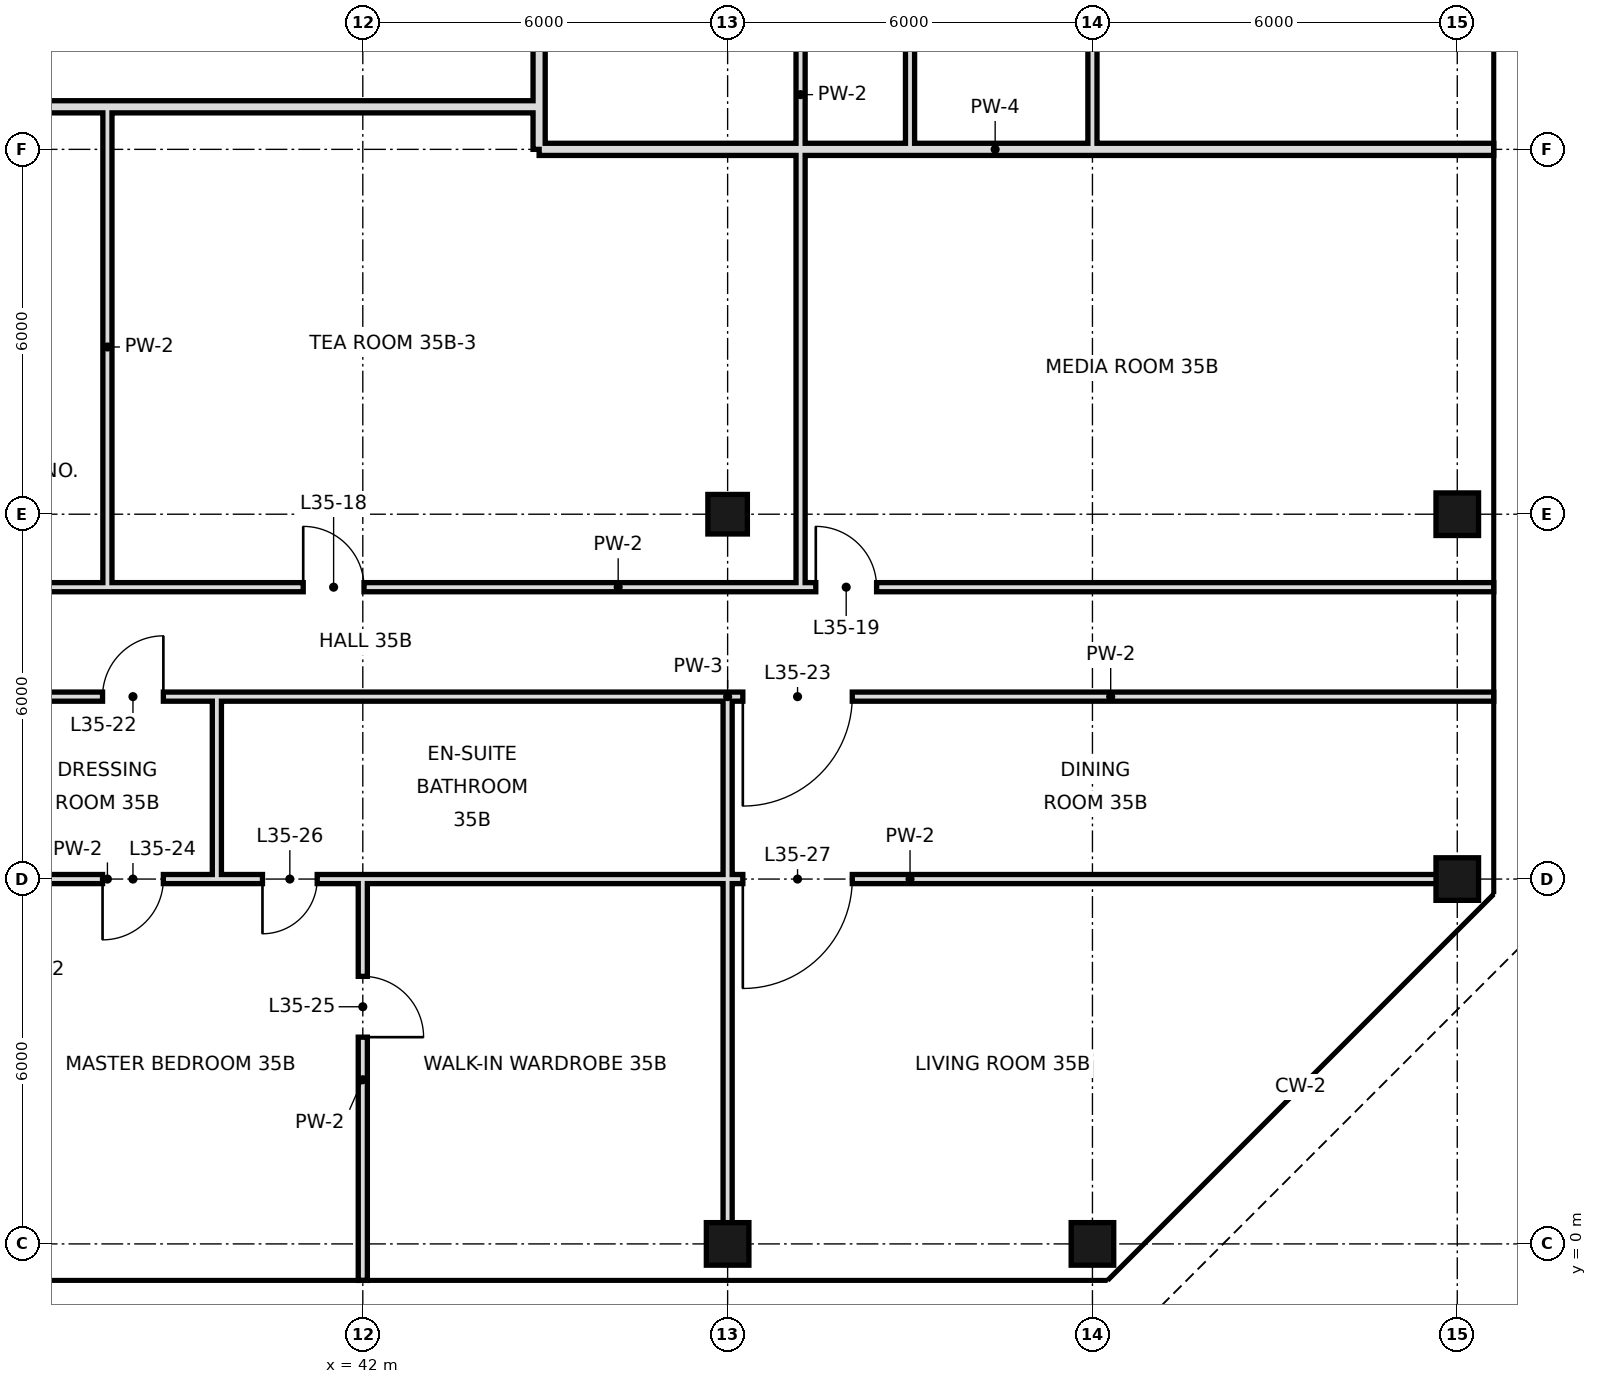
"""IFC4 building model, lengths in metres.
Left out: names, types, materials, properties, quantities, classifications, styles, units other than length and angle.
Written with IfcOpenShell. Run it as: python <this file> out.ifc"""

import sys

from ifc_helpers import new_model, si_unit, direction, frame, frame_2d, origin, origin_2d, place, context, subcontext, project, spatial, rectangle, hollow_rectangle, extrude, element, fill, save


model = new_model("IFC4")
c1 = context("Model", 3, precision=1e-05, world=origin(), true_north=direction((0.0, 1.0)))
c2 = subcontext(c1, "Body", "Model", "MODEL_VIEW")
j1 = project(units=[si_unit("LENGTHUNIT", "METRE"), si_unit("PLANEANGLEUNIT", "RADIAN")], contexts=[c1])
p1 = place(None, origin())
s1 = spatial("IfcSite", under=j1, at=p1, CompositionType="ELEMENT")
p2 = place(p1, origin())
s2 = spatial("IfcBuilding", under=s1, at=p2, CompositionType="ELEMENT")
p3 = place(p2, frame((0.0, 0.0, 154.6)))
s3 = spatial("IfcBuildingStorey", under=s2, at=p3, CompositionType="ELEMENT", Elevation=154.6)
p4 = place(p3, frame((48.0, 0.0, 0.0), z_axis=(0.0, 0.0, 1.0), x_axis=(1.0, 0.0, 0.0)))
e1 = element("IfcColumn", 1, at=p4, inside=s3, PredefinedType="COLUMN", context=c2, shape_type="SweptSolid", body=[
    extrude(hollow_rectangle(XDim=0.7, YDim=0.7, WallThickness=0.036, at=origin_2d()), origin(), (0.0, 0.0, 1.0), 3.6),
])
p5 = place(p3, frame((48.0, 12.0, 0.0), z_axis=(0.0, 0.0, 1.0), x_axis=(1.0, 0.0, 0.0)))
e2 = element("IfcColumn", 2, at=p5, inside=s3, PredefinedType="COLUMN", context=c2, shape_type="SweptSolid", body=[
    extrude(hollow_rectangle(XDim=0.65, YDim=0.65, WallThickness=0.032, at=origin_2d()), origin(), (0.0, 0.0, 1.0), 3.6),
])
for number, where, z_axis, x_axis in (
    (3, (54.0, 0.0, 0.0), (0.0, 0.0, 1.0), (1.0, 0.0, 0.0)),
    (4, (60.0, 6.0, 0.0), (0.0, 0.0, 1.0), (1.0, 0.0, 0.0)),
    (5, (60.0, 12.0, 0.0), (0.0, 0.0, 1.0), (1.0, 0.0, 0.0)),
):
    element("IfcColumn", number, at=place(p3, frame(where, z_axis=z_axis, x_axis=x_axis)), inside=s3, PredefinedType="COLUMN", context=c2, shape_type="SweptSolid", body=[
        extrude(hollow_rectangle(XDim=0.7, YDim=0.7, WallThickness=0.036, at=origin_2d()), origin(), (0.0, 0.0, 1.0), 3.6),
    ])
p6 = place(p3, frame((37.8, 10.8, 0.0), z_axis=(0.0, 0.0, 1.0), x_axis=(0.0, 1.0, 0.0)))
e6 = element("IfcWall", 6, at=p6, inside=s3, PredefinedType="PARTITIONING", context=c2, shape_type="SweptSolid", body=[
    extrude(rectangle(XDim=7.9, YDim=0.15, at=frame_2d((3.95, 0.0))), origin(), (0.0, 0.0, 1.0), 3.42),
])
p7 = place(p3, frame((39.6, 6.0, 0.0), z_axis=(0.0, 0.0, 1.0), x_axis=(0.0, 1.0, 0.0)))
e7 = element("IfcWall", 7, at=p7, inside=s3, PredefinedType="PARTITIONING", context=c2, shape_type="SweptSolid", body=[
    extrude(rectangle(XDim=3.0, YDim=0.15, at=frame_2d((1.5, 0.0))), origin(), (0.0, 0.0, 1.0), 3.42),
])
p8 = place(p3, frame((42.0, -0.6, 0.0), z_axis=(0.0, 0.0, 1.0), x_axis=(0.0, 1.0, 0.0)))
e8 = element("IfcWall", 8, at=p8, inside=s3, PredefinedType="PARTITIONING", context=c2, shape_type="SweptSolid", body=[
    extrude(rectangle(XDim=6.6, YDim=0.15, at=frame_2d((3.3, 0.0))), origin(), (0.0, 0.0, 1.0), 2.72),
])
p9 = place(p8, frame((4.0, 0.0, 0.0)))
e9 = element("IfcOpeningElement", 9, at=p9, cuts=e8, PredefinedType="OPENING", context=c2, shape_type="SweptSolid", body=[
    extrude(rectangle(XDim=1.0, YDim=2.4, at=frame_2d((0.5, 1.2))), frame((0.0, 0.085, 0.0), z_axis=(0.0, -1.0, 0.0), x_axis=(1.0, 0.0, 0.0)), (0.0, 0.0, 1.0), 0.17),
])
p10 = place(p3, frame((44.9, 18.7, 0.0), z_axis=(0.0, 0.0, 1.0), x_axis=(0.0, 1.0, 0.0)))
e10 = element("IfcWall", 10, at=p10, inside=s3, PredefinedType="SOLIDWALL", context=c2, shape_type="SweptSolid", body=[
    extrude(rectangle(XDim=25.7, YDim=0.2, at=frame_2d((12.85, 0.0))), origin(), (0.0, 0.0, 1.0), 2.97),
])
p11 = place(p10, frame((12.5, 0.0, 0.0)))
e11 = element("IfcOpeningElement", 11, at=p11, cuts=e10, PredefinedType="OPENING", context=c2, shape_type="SweptSolid", body=[
    extrude(rectangle(XDim=1.2, YDim=2.4, at=frame_2d((0.6, 1.2))), frame((0.0, 0.11, 0.0), z_axis=(0.0, -1.0, 0.0), x_axis=(1.0, 0.0, 0.0)), (0.0, 0.0, 1.0), 0.22),
])
p12 = place(p3, frame((44.9, 18.0, 0.0), z_axis=(0.0, 0.0, 1.0), x_axis=(0.0, 1.0, 0.0)))
e12 = element("IfcWall", 12, at=p12, inside=s3, PredefinedType="SOLIDWALL", context=c2, shape_type="SweptSolid", body=[
    extrude(rectangle(XDim=0.7, YDim=0.2, at=frame_2d((0.35, 0.0))), origin(), (0.0, 0.0, 1.0), 2.97),
])
p13 = place(p3, frame((48.0, 0.0, 0.0), z_axis=(0.0, 0.0, 1.0), x_axis=(0.0, 1.0, 0.0)))
e13 = element("IfcWall", 13, at=p13, inside=s3, PredefinedType="PARTITIONING", context=c2, shape_type="SweptSolid", body=[
    extrude(rectangle(XDim=6.0, YDim=0.15, at=frame_2d((3.0, 0.0))), origin(), (0.0, 0.0, 1.0), 2.72),
])
p14 = place(p3, frame((48.0, 6.0, 0.0), z_axis=(0.0, 0.0, 1.0), x_axis=(0.0, 1.0, 0.0)))
e14 = element("IfcWall", 14, at=p14, inside=s3, PredefinedType="PARTITIONING", context=c2, shape_type="SweptSolid", body=[
    extrude(rectangle(XDim=3.0, YDim=0.15, at=frame_2d((1.5, 0.0))), origin(), (0.0, 0.0, 1.0), 2.72),
])
p15 = place(p3, frame((49.2, 10.8, 0.0), z_axis=(0.0, 0.0, 1.0), x_axis=(0.0, 1.0, 0.0)))
e15 = element("IfcWall", 15, at=p15, inside=s3, PredefinedType="PARTITIONING", context=c2, shape_type="SweptSolid", body=[
    extrude(rectangle(XDim=16.2, YDim=0.15, at=frame_2d((8.1, 0.0))), origin(), (0.0, 0.0, 1.0), 3.42),
])
p16 = place(p15, frame((11.2, 0.0, 0.0)))
e16 = element("IfcOpeningElement", 16, at=p16, cuts=e15, PredefinedType="OPENING", context=c2, shape_type="SweptSolid", body=[
    extrude(rectangle(XDim=1.0, YDim=2.4, at=frame_2d((0.5, 1.2))), frame((0.0, 0.085, 0.0), z_axis=(0.0, -1.0, 0.0), x_axis=(1.0, 0.0, 0.0)), (0.0, 0.0, 1.0), 0.17),
])
p17 = place(p3, frame((51.0, 18.0, 0.0), z_axis=(0.0, 0.0, 1.0), x_axis=(0.0, 1.0, 0.0)))
e17 = element("IfcWall", 17, at=p17, inside=s3, PredefinedType="PARTITIONING", context=c2, shape_type="SweptSolid", body=[
    extrude(rectangle(XDim=8.4, YDim=0.15, at=frame_2d((4.2, 0.0))), origin(), (0.0, 0.0, 1.0), 3.42),
])
p18 = place(p3, frame((54.0, 18.0, 0.0), z_axis=(0.0, 0.0, 1.0), x_axis=(0.0, 1.0, 0.0)))
e18 = element("IfcWall", 18, at=p18, inside=s3, PredefinedType="PARTITIONING", context=c2, shape_type="SweptSolid", body=[
    extrude(rectangle(XDim=8.4, YDim=0.15, at=frame_2d((4.2, 0.0))), origin(), (0.0, 0.0, 1.0), 3.42),
])
p19 = place(p18, frame((6.75, 0.0, 0.0)))
e19 = element("IfcOpeningElement", 19, at=p19, cuts=e18, PredefinedType="OPENING", context=c2, shape_type="SweptSolid", body=[
    extrude(rectangle(XDim=0.9, YDim=2.4, at=frame_2d((0.45, 1.2))), frame((0.0, 0.085, 0.0), z_axis=(0.0, -1.0, 0.0), x_axis=(1.0, 0.0, 0.0)), (0.0, 0.0, 1.0), 0.17),
])
p20 = place(p3, frame((31.8, 10.8, 0.0), z_axis=(0.0, 0.0, 1.0), x_axis=(1.0, 0.0, 0.0)))
e20 = element("IfcWall", 20, at=p20, inside=s3, PredefinedType="PARTITIONING", context=c2, shape_type="SweptSolid", body=[
    extrude(rectangle(XDim=28.8, YDim=0.15, at=frame_2d((14.4, 0.0))), origin(), (0.0, 0.0, 1.0), 3.42),
])
p21 = place(p20, frame((1.6, 0.0, 0.0)))
e21 = element("IfcOpeningElement", 21, at=p21, cuts=e20, PredefinedType="OPENING", context=c2, shape_type="SweptSolid", body=[
    extrude(rectangle(XDim=1.0, YDim=2.4, at=frame_2d((0.5, 1.2))), frame((0.0, 0.085, 0.0), z_axis=(0.0, -1.0, 0.0), x_axis=(1.0, 0.0, 0.0)), (0.0, 0.0, 1.0), 0.17),
])
p22 = place(p20, frame((9.22, 0.0, 0.0)))
e22 = element("IfcOpeningElement", 22, at=p22, cuts=e20, PredefinedType="OPENING", context=c2, shape_type="SweptSolid", body=[
    extrude(rectangle(XDim=1.0, YDim=2.4, at=frame_2d((0.5, 1.2))), frame((0.0, 0.085, 0.0), z_axis=(0.0, -1.0, 0.0), x_axis=(1.0, 0.0, 0.0)), (0.0, 0.0, 1.0), 0.17),
])
p23 = place(p20, frame((17.65, 0.0, 0.0)))
e23 = element("IfcOpeningElement", 23, at=p23, cuts=e20, PredefinedType="OPENING", context=c2, shape_type="SweptSolid", body=[
    extrude(rectangle(XDim=1.0, YDim=2.4, at=frame_2d((0.5, 1.2))), frame((0.0, 0.085, 0.0), z_axis=(0.0, -1.0, 0.0), x_axis=(1.0, 0.0, 0.0)), (0.0, 0.0, 1.0), 0.17),
])
p24 = place(p3, frame((44.9, 18.0, 0.0), z_axis=(0.0, 0.0, 1.0), x_axis=(1.0, 0.0, 0.0)))
e24 = element("IfcWall", 24, at=p24, inside=s3, PredefinedType="SOLIDWALL", context=c2, shape_type="SweptSolid", body=[
    extrude(rectangle(XDim=15.7, YDim=0.2, at=frame_2d((7.85, 0.0))), origin(), (0.0, 0.0, 1.0), 2.72),
])
p25 = place(p3, frame((31.8, 18.7, 0.0), z_axis=(0.0, 0.0, 1.0), x_axis=(1.0, 0.0, 0.0)))
e25 = element("IfcWall", 25, at=p25, inside=s3, PredefinedType="SOLIDWALL", context=c2, shape_type="SweptSolid", body=[
    extrude(rectangle(XDim=13.1, YDim=0.2, at=frame_2d((6.55, 0.0))), origin(), (0.0, 0.0, 1.0), 2.72),
])
p26 = place(p25, frame((1.54, 0.0, 0.0)))
e26 = element("IfcOpeningElement", 26, at=p26, cuts=e25, PredefinedType="OPENING", context=c2, shape_type="SweptSolid", body=[
    extrude(rectangle(XDim=1.2, YDim=2.4, at=frame_2d((0.6, 1.2))), frame((0.0, 0.11, 0.0), z_axis=(0.0, -1.0, 0.0), x_axis=(1.0, 0.0, 0.0)), (0.0, 0.0, 1.0), 0.22),
])
p27 = place(p3, frame((36.0, 6.0, 0.0), z_axis=(0.0, 0.0, 1.0), x_axis=(1.0, 0.0, 0.0)))
e27 = element("IfcWall", 27, at=p27, inside=s3, PredefinedType="PARTITIONING", context=c2, shape_type="SweptSolid", body=[
    extrude(rectangle(XDim=3.6, YDim=0.15, at=frame_2d((1.8, 0.0))), origin(), (0.0, 0.0, 1.0), 2.97),
])
p28 = place(p27, frame((1.72, 0.0, 0.0)))
e28 = element("IfcOpeningElement", 28, at=p28, cuts=e27, PredefinedType="OPENING", context=c2, shape_type="SweptSolid", body=[
    extrude(rectangle(XDim=1.0, YDim=2.4, at=frame_2d((0.5, 1.2))), frame((0.0, 0.085, 0.0), z_axis=(0.0, -1.0, 0.0), x_axis=(1.0, 0.0, 0.0)), (0.0, 0.0, 1.0), 0.17),
])
p29 = place(p3, frame((48.0, 6.0, 0.0), z_axis=(0.0, 0.0, 1.0), x_axis=(1.0, 0.0, 0.0)))
e29 = element("IfcWall", 29, at=p29, inside=s3, PredefinedType="PARTITIONING", context=c2, shape_type="SweptSolid", body=[
    extrude(rectangle(XDim=12.0, YDim=0.15, at=frame_2d((6.0, 0.0))), origin(), (0.0, 0.0, 1.0), 2.72),
])
p30 = place(p29, frame((0.25, 0.0, 0.0)))
e30 = element("IfcOpeningElement", 30, at=p30, cuts=e29, PredefinedType="OPENING", context=c2, shape_type="SweptSolid", body=[
    extrude(rectangle(XDim=1.8, YDim=2.4, at=frame_2d((0.9, 1.2))), frame((0.0, 0.085, 0.0), z_axis=(0.0, -1.0, 0.0), x_axis=(1.0, 0.0, 0.0)), (0.0, 0.0, 1.0), 0.17),
])
p31 = place(p3, frame((39.6, 6.0, 0.0), z_axis=(0.0, 0.0, 1.0), x_axis=(1.0, 0.0, 0.0)))
e31 = element("IfcWall", 31, at=p31, inside=s3, PredefinedType="PARTITIONING", context=c2, shape_type="SweptSolid", body=[
    extrude(rectangle(XDim=8.4, YDim=0.15, at=frame_2d((4.2, 0.0))), origin(), (0.0, 0.0, 1.0), 2.97),
])
p32 = place(p31, frame((0.75, 0.0, 0.0)))
e32 = element("IfcOpeningElement", 32, at=p32, cuts=e31, PredefinedType="OPENING", context=c2, shape_type="SweptSolid", body=[
    extrude(rectangle(XDim=0.9, YDim=2.4, at=frame_2d((0.45, 1.2))), frame((0.0, 0.085, 0.0), z_axis=(0.0, -1.0, 0.0), x_axis=(1.0, 0.0, 0.0)), (0.0, 0.0, 1.0), 0.17),
])
p33 = place(p3, frame((15.0, 9.0, 0.0), z_axis=(0.0, 0.0, 1.0), x_axis=(1.0, 0.0, 0.0)))
e33 = element("IfcWall", 33, at=p33, inside=s3, PredefinedType="PARTITIONING", context=c2, shape_type="SweptSolid", body=[
    extrude(rectangle(XDim=24.6, YDim=0.15, at=frame_2d((12.3, 0.0))), origin(), (0.0, 0.0, 1.0), 3.42),
])
p34 = place(p33, frame((1.3, 0.0, 0.0)))
e34 = element("IfcOpeningElement", 34, at=p34, cuts=e33, PredefinedType="OPENING", context=c2, shape_type="SweptSolid", body=[
    extrude(rectangle(XDim=1.0, YDim=2.4, at=frame_2d((0.5, 1.2))), frame((0.0, 0.085, 0.0), z_axis=(0.0, -1.0, 0.0), x_axis=(1.0, 0.0, 0.0)), (0.0, 0.0, 1.0), 0.17),
])
p35 = place(p33, frame((5.84, 0.0, 0.0)))
e35 = element("IfcOpeningElement", 35, at=p35, cuts=e33, PredefinedType="OPENING", context=c2, shape_type="SweptSolid", body=[
    extrude(rectangle(XDim=1.8, YDim=2.4, at=frame_2d((0.9, 1.2))), frame((0.0, 0.085, 0.0), z_axis=(0.0, -1.0, 0.0), x_axis=(1.0, 0.0, 0.0)), (0.0, 0.0, 1.0), 0.17),
])
p36 = place(p33, frame((10.6, 0.0, 0.0)))
e36 = element("IfcOpeningElement", 36, at=p36, cuts=e33, PredefinedType="OPENING", context=c2, shape_type="SweptSolid", body=[
    extrude(rectangle(XDim=1.0, YDim=2.4, at=frame_2d((0.5, 1.2))), frame((0.0, 0.085, 0.0), z_axis=(0.0, -1.0, 0.0), x_axis=(1.0, 0.0, 0.0)), (0.0, 0.0, 1.0), 0.17),
])
p37 = place(p33, frame((16.6, 0.0, 0.0)))
e37 = element("IfcOpeningElement", 37, at=p37, cuts=e33, PredefinedType="OPENING", context=c2, shape_type="SweptSolid", body=[
    extrude(rectangle(XDim=1.0, YDim=2.4, at=frame_2d((0.5, 1.2))), frame((0.0, 0.085, 0.0), z_axis=(0.0, -1.0, 0.0), x_axis=(1.0, 0.0, 0.0)), (0.0, 0.0, 1.0), 0.17),
])
p38 = place(p33, frame((22.72, 0.0, 0.0)))
e38 = element("IfcOpeningElement", 38, at=p38, cuts=e33, PredefinedType="OPENING", context=c2, shape_type="SweptSolid", body=[
    extrude(rectangle(XDim=1.0, YDim=2.4, at=frame_2d((0.5, 1.2))), frame((0.0, 0.085, 0.0), z_axis=(0.0, -1.0, 0.0), x_axis=(1.0, 0.0, 0.0)), (0.0, 0.0, 1.0), 0.17),
])
p39 = place(p3, frame((48.0, 9.0, 0.0), z_axis=(0.0, 0.0, 1.0), x_axis=(1.0, 0.0, 0.0)))
e39 = element("IfcWall", 39, at=p39, inside=s3, PredefinedType="PARTITIONING", context=c2, shape_type="SweptSolid", body=[
    extrude(rectangle(XDim=12.6, YDim=0.15, at=frame_2d((6.3, 0.0))), origin(), (0.0, 0.0, 1.0), 3.42),
])
p40 = place(p39, frame((0.25, 0.0, 0.0)))
e40 = element("IfcOpeningElement", 40, at=p40, cuts=e39, PredefinedType="OPENING", context=c2, shape_type="SweptSolid", body=[
    extrude(rectangle(XDim=1.8, YDim=2.4, at=frame_2d((0.9, 1.2))), frame((0.0, 0.085, 0.0), z_axis=(0.0, -1.0, 0.0), x_axis=(1.0, 0.0, 0.0)), (0.0, 0.0, 1.0), 0.17),
])
p41 = place(p3, frame((39.6, 9.0, 0.0), z_axis=(0.0, 0.0, 1.0), x_axis=(1.0, 0.0, 0.0)))
e41 = element("IfcWall", 41, at=p41, inside=s3, PredefinedType="PARTITIONING", context=c2, shape_type="SweptSolid", body=[
    extrude(rectangle(XDim=8.4, YDim=0.15, at=frame_2d((4.2, 0.0))), origin(), (0.0, 0.0, 1.0), 3.42),
])
p42 = place(p22, origin())
e42 = element("IfcDoor", 42, at=p42, inside=s3, OperationType="SINGLE_SWING_LEFT", PredefinedType="DOOR", context=c2, shape_type="SweptSolid", body=[
    extrude(rectangle(XDim=1.0, YDim=2.4, at=frame_2d((0.5, 1.2))), frame((0.0, 0.025, 0.0), z_axis=(0.0, -1.0, 0.0), x_axis=(1.0, 0.0, 0.0)), (0.0, 0.0, 1.0), 0.05),
])
fill(e22, e42)
p43 = place(p23, origin())
e43 = element("IfcDoor", 43, at=p43, inside=s3, OperationType="SINGLE_SWING_LEFT", PredefinedType="DOOR", context=c2, shape_type="SweptSolid", body=[
    extrude(rectangle(XDim=1.0, YDim=2.4, at=frame_2d((0.5, 1.2))), frame((0.0, 0.025, 0.0), z_axis=(0.0, -1.0, 0.0), x_axis=(1.0, 0.0, 0.0)), (0.0, 0.0, 1.0), 0.05),
])
fill(e23, e43)
p44 = place(p38, frame((1.0, 0.0, 0.0), z_axis=(0.0, 0.0, 1.0), x_axis=(-1.0, 0.0, 0.0)))
e44 = element("IfcDoor", 44, at=p44, inside=s3, OperationType="SINGLE_SWING_LEFT", PredefinedType="DOOR", context=c2, shape_type="SweptSolid", body=[
    extrude(rectangle(XDim=1.0, YDim=2.4, at=frame_2d((0.5, 1.2))), frame((0.0, 0.025, 0.0), z_axis=(0.0, -1.0, 0.0), x_axis=(1.0, 0.0, 0.0)), (0.0, 0.0, 1.0), 0.05),
])
fill(e38, e44)
p45 = place(p40, frame((1.8, 0.0, 0.0), z_axis=(0.0, 0.0, 1.0), x_axis=(-1.0, 0.0, 0.0)))
e45 = element("IfcDoor", 45, at=p45, inside=s3, OperationType="SINGLE_SWING_RIGHT", PredefinedType="DOOR", context=c2, shape_type="SweptSolid", body=[
    extrude(rectangle(XDim=1.8, YDim=2.4, at=frame_2d((0.9, 1.2))), frame((0.0, 0.025, 0.0), z_axis=(0.0, -1.0, 0.0), x_axis=(1.0, 0.0, 0.0)), (0.0, 0.0, 1.0), 0.05),
])
fill(e40, e45)
p46 = place(p28, frame((1.0, 0.0, 0.0), z_axis=(0.0, 0.0, 1.0), x_axis=(-1.0, 0.0, 0.0)))
e46 = element("IfcDoor", 46, at=p46, inside=s3, OperationType="SINGLE_SWING_RIGHT", PredefinedType="DOOR", context=c2, shape_type="SweptSolid", body=[
    extrude(rectangle(XDim=1.0, YDim=2.4, at=frame_2d((0.5, 1.2))), frame((0.0, 0.025, 0.0), z_axis=(0.0, -1.0, 0.0), x_axis=(1.0, 0.0, 0.0)), (0.0, 0.0, 1.0), 0.05),
])
fill(e28, e46)
p47 = place(p9, frame((1.0, 0.0, 0.0), z_axis=(0.0, 0.0, 1.0), x_axis=(-1.0, 0.0, 0.0)))
e47 = element("IfcDoor", 47, at=p47, inside=s3, OperationType="SINGLE_SWING_RIGHT", PredefinedType="DOOR", context=c2, shape_type="SweptSolid", body=[
    extrude(rectangle(XDim=1.0, YDim=2.4, at=frame_2d((0.5, 1.2))), frame((0.0, 0.025, 0.0), z_axis=(0.0, -1.0, 0.0), x_axis=(1.0, 0.0, 0.0)), (0.0, 0.0, 1.0), 0.05),
])
fill(e9, e47)
p48 = place(p32, frame((0.9, 0.0, 0.0), z_axis=(0.0, 0.0, 1.0), x_axis=(-1.0, 0.0, 0.0)))
e48 = element("IfcDoor", 48, at=p48, inside=s3, OperationType="SINGLE_SWING_RIGHT", PredefinedType="DOOR", context=c2, shape_type="SweptSolid", body=[
    extrude(rectangle(XDim=0.9, YDim=2.4, at=frame_2d((0.45, 1.2))), frame((0.0, 0.025, 0.0), z_axis=(0.0, -1.0, 0.0), x_axis=(1.0, 0.0, 0.0)), (0.0, 0.0, 1.0), 0.05),
])
fill(e32, e48)
p49 = place(p30, frame((1.8, 0.0, 0.0), z_axis=(0.0, 0.0, 1.0), x_axis=(-1.0, 0.0, 0.0)))
e49 = element("IfcDoor", 49, at=p49, inside=s3, OperationType="SINGLE_SWING_RIGHT", PredefinedType="DOOR", context=c2, shape_type="SweptSolid", body=[
    extrude(rectangle(XDim=1.8, YDim=2.4, at=frame_2d((0.9, 1.2))), frame((0.0, 0.025, 0.0), z_axis=(0.0, -1.0, 0.0), x_axis=(1.0, 0.0, 0.0)), (0.0, 0.0, 1.0), 0.05),
])
fill(e30, e49)
save(model, sys.argv[1])
